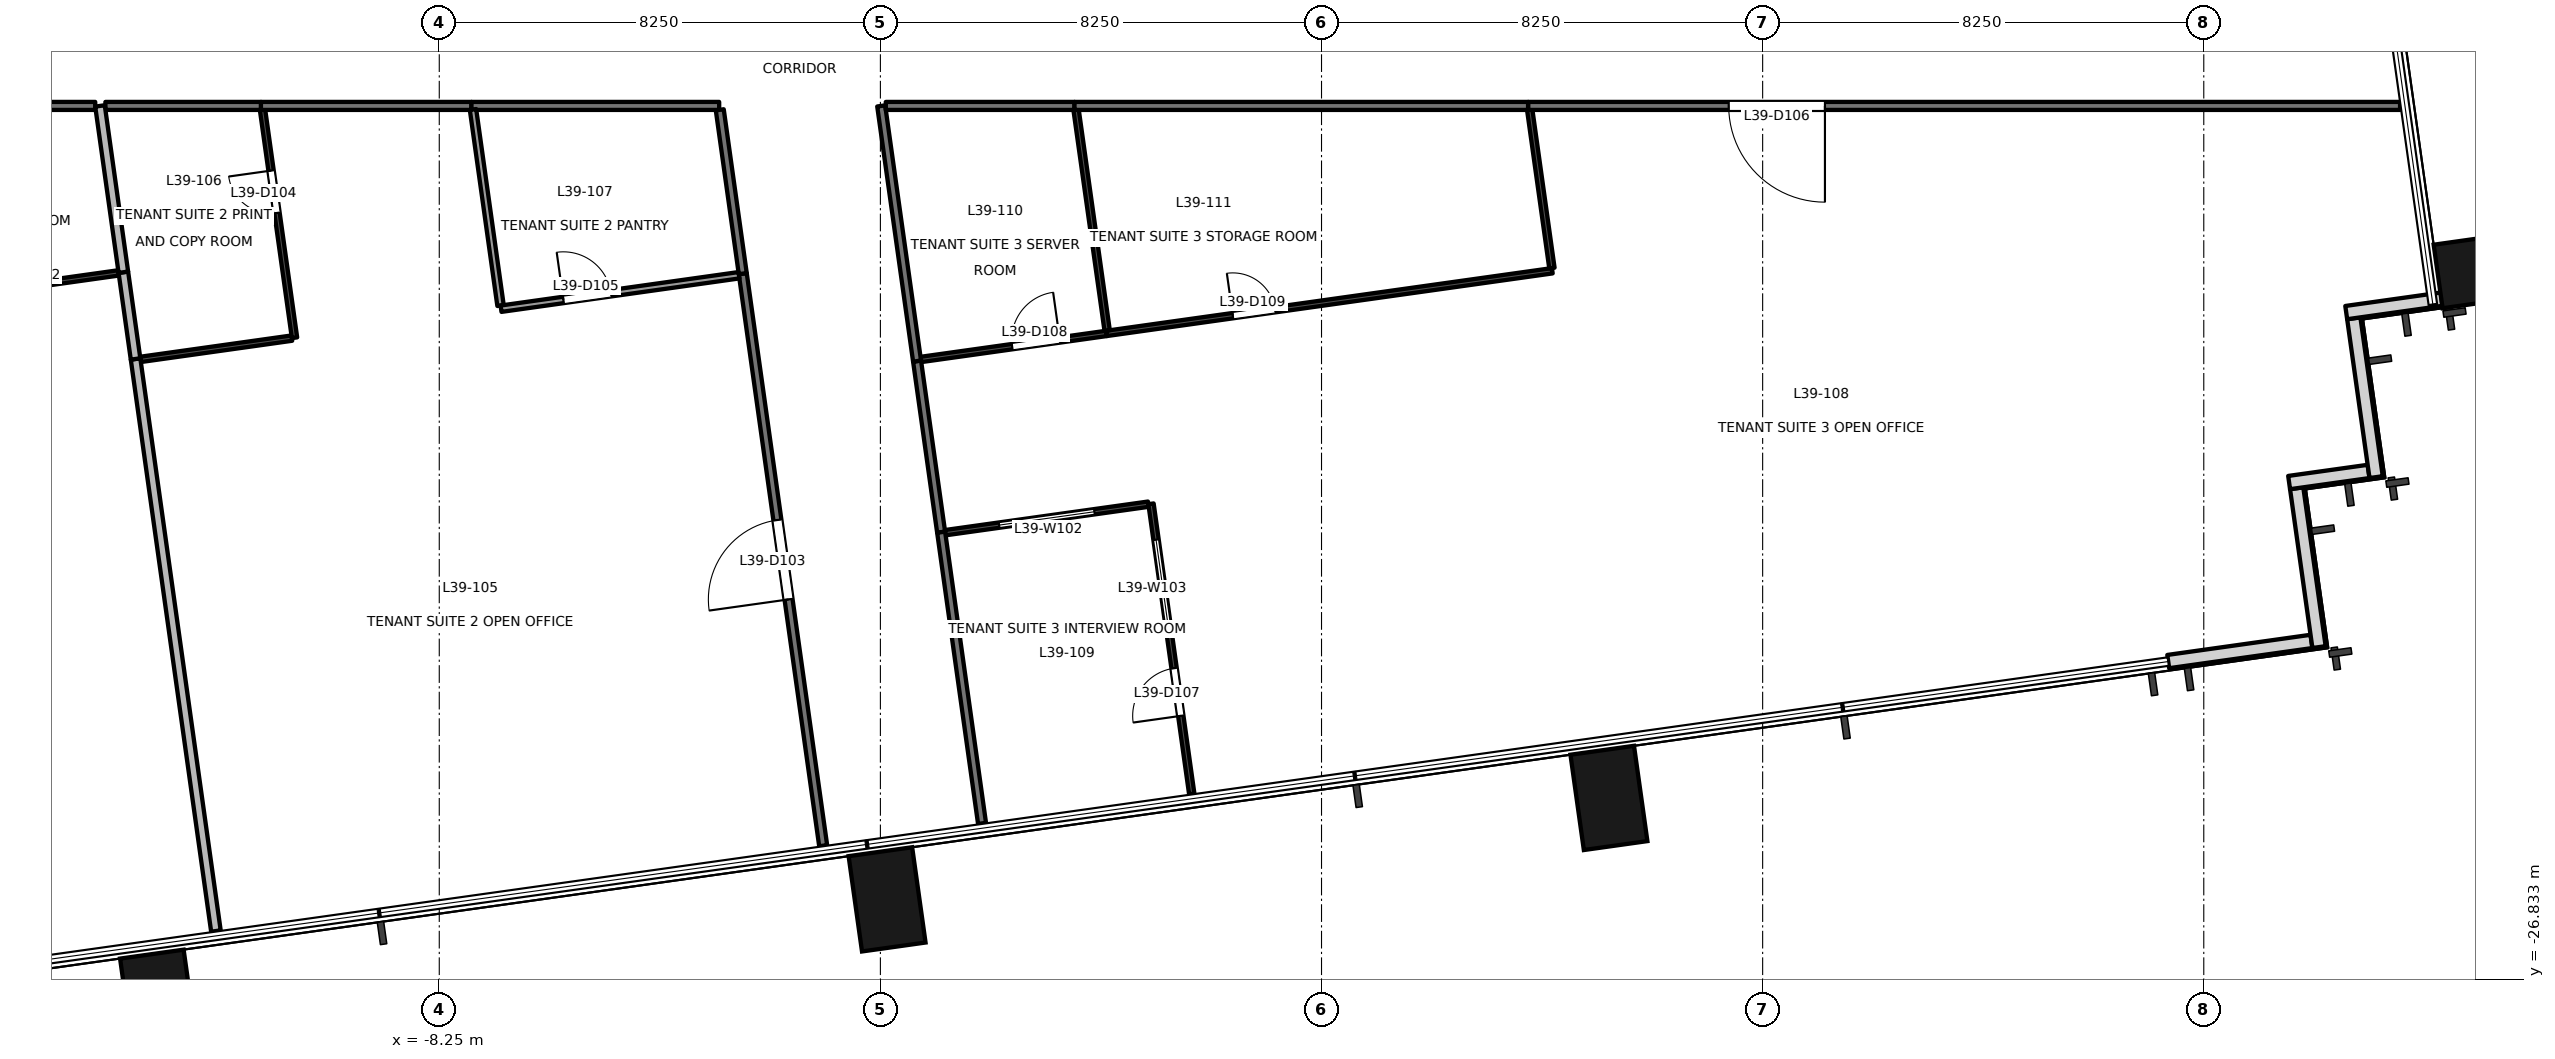
"""IFC4 building model, lengths in metres.
Left out: names, types, materials, properties, quantities, classifications, styles, units other than length and angle.
Written with IfcOpenShell. Run it as: python <this file> out.ifc"""

import sys

from ifc_helpers import new_model, si_unit, direction, frame, frame_2d, origin, origin_2d, place, context, subcontext, project, spatial, rectangle, extrude, element, fill, save


model = new_model("IFC4")
c1 = context("Model", 3, precision=1e-05, world=origin(), true_north=direction((0.0, 1.0)))
c2 = subcontext(c1, "Body", "Model", "MODEL_VIEW")
j1 = project(units=[si_unit("LENGTHUNIT", "METRE"), si_unit("PLANEANGLEUNIT", "RADIAN")], contexts=[c1])
p1 = place(None, origin())
s1 = spatial("IfcSite", under=j1, at=p1, CompositionType="ELEMENT")
p2 = place(p1, origin())
s2 = spatial("IfcBuilding", under=s1, at=p2, CompositionType="ELEMENT")
p3 = place(p2, frame((0.0, 0.0, 172.4)))
s3 = spatial("IfcBuildingStorey", under=s2, at=p3, CompositionType="ELEMENT", Elevation=172.4)
for number, where, z_axis, x_axis in (
    (1, (-13.5, -27.256, -0.2), (0.0, 0.0, 1.0), (0.99, 0.139, 0.0)),
    (2, (0.125, -25.34, -0.2), (0.0, 0.0, 1.0), (0.99, 0.139, 0.0)),
    (3, (13.625, -23.443, -0.2), (0.0, 0.0, 1.0), (0.99, 0.139, 0.0)),
    (4, (30.024, -13.565, -0.2), (0.0, 0.0, 1.0), (-0.139, 0.99, 0.0)),
):
    element("IfcColumn", number, at=place(p3, frame(where, z_axis=z_axis, x_axis=x_axis)), inside=s3, PredefinedType="COLUMN", context=c2, shape_type="SweptSolid", body=[
        extrude(rectangle(XDim=1.2, YDim=1.8, at=origin_2d()), origin(), (0.0, 0.0, 1.0), 3.9),
    ])
p4 = place(p3, frame((24.085, -20.893, 0.0), z_axis=(0.0, 0.0, 1.0), x_axis=(0.990255800966, 0.139260362823, 0.0)))
e5 = element("IfcWall", 5, at=p4, inside=s3, PredefinedType="SOLIDWALL", context=c2, shape_type="SweptSolid", body=[
    extrude(rectangle(XDim=2.705, YDim=0.25, at=frame_2d((1.353, 0.0))), origin(), (0.0, 0.0, 1.0), 3.7),
])
p5 = place(p3, frame((26.905, -20.622, 0.0), z_axis=(0.0, 0.0, 1.0), x_axis=(-0.139313431826, 0.990248336385, 0.0)))
e6 = element("IfcWall", 6, at=p5, inside=s3, PredefinedType="SOLIDWALL", context=c2, shape_type="SweptSolid", body=[
    extrude(rectangle(XDim=3.0, YDim=0.25, at=frame_2d((1.5, 0.0))), origin(), (0.0, 0.0, 1.0), 3.7),
])
p6 = place(p3, frame((26.346, -17.544, 0.0), z_axis=(0.0, 0.0, 1.0), x_axis=(0.990368090482, 0.13845954411, 0.0)))
e7 = element("IfcWall", 7, at=p6, inside=s3, PredefinedType="SOLIDWALL", context=c2, shape_type="SweptSolid", body=[
    extrude(rectangle(XDim=1.5, YDim=0.25, at=frame_2d((0.75, 0.0))), origin(), (0.0, 0.0, 1.0), 3.7),
])
p7 = place(p3, frame((27.973, -17.443, 0.0), z_axis=(0.0, 0.0, 1.0), x_axis=(-0.139313431826, 0.990248336385, 0.0)))
e8 = element("IfcWall", 8, at=p7, inside=s3, PredefinedType="SOLIDWALL", context=c2, shape_type="SweptSolid", body=[
    extrude(rectangle(XDim=3.0, YDim=0.25, at=frame_2d((1.5, 0.0))), origin(), (0.0, 0.0, 1.0), 3.7),
])
p8 = place(p3, frame((27.414, -14.366, 0.0), z_axis=(0.0, 0.0, 1.0), x_axis=(0.990256286673, 0.139256908998, 0.0)))
e9 = element("IfcWall", 9, at=p8, inside=s3, PredefinedType="SOLIDWALL", context=c2, shape_type="SweptSolid", body=[
    extrude(rectangle(XDim=1.801, YDim=0.25, at=frame_2d((0.9, 0.0))), origin(), (0.0, 0.0, 1.0), 3.7),
])
p9 = place(p3, frame((-14.684, -10.5, 0.0), z_axis=(0.0, 0.0, 1.0), x_axis=(-1.0, 0.0, 0.0)))
e10 = element("IfcWall", 10, at=p9, inside=s3, PredefinedType="PARTITIONING", context=c2, shape_type="SweptSolid", body=[
    extrude(rectangle(XDim=4.882, YDim=0.15, at=frame_2d((2.441, 0.0))), origin(), (0.0, 0.0, 1.0), 3.7),
])
p10 = place(p3, frame((-7.648, -10.5, 0.0), z_axis=(0.0, 0.0, 1.0), x_axis=(-1.0, 0.0, 0.0)))
e11 = element("IfcWall", 11, at=p10, inside=s3, PredefinedType="PARTITIONING", context=c2, shape_type="SweptSolid", body=[
    extrude(rectangle(XDim=3.938, YDim=0.15, at=frame_2d((1.969, 0.0))), origin(), (0.0, 0.0, 1.0), 2.8),
])
p11 = place(p3, frame((-1.07, -24.337, 0.0), z_axis=(0.0, 0.0, 1.0), x_axis=(-0.139184552649, 0.990266459244, 0.0)))
e12 = element("IfcWall", 12, at=p11, inside=s3, PredefinedType="PARTITIONING", context=c2, shape_type="SweptSolid", body=[
    extrude(rectangle(XDim=10.805, YDim=0.15, at=frame_2d((5.403, 0.0))), origin(), (0.0, 0.0, 1.0), 3.7),
])
p12 = place(p11, frame((4.652, 0.0, 0.0)))
e13 = element("IfcOpeningElement", 13, at=p12, cuts=e12, PredefinedType="OPENING", context=c2, shape_type="SweptSolid", body=[
    extrude(rectangle(XDim=1.5, YDim=2.1, at=frame_2d((0.75, 1.05))), frame((0.0, 0.085, 0.0), z_axis=(0.0, -1.0, 0.0), x_axis=(1.0, 0.0, 0.0)), (0.0, 0.0, 1.0), 0.171),
])
p13 = place(p3, frame((-11.586, -10.5, 0.0), z_axis=(0.0, 0.0, 1.0), x_axis=(-1.0, 0.0, 0.0)))
e14 = element("IfcWall", 14, at=p13, inside=s3, PredefinedType="PARTITIONING", context=c2, shape_type="SweptSolid", body=[
    extrude(rectangle(XDim=2.908, YDim=0.15, at=frame_2d((1.454, 0.0))), origin(), (0.0, 0.0, 1.0), 2.8),
])
p14 = place(p3, frame((-3.015, -10.5, 0.0), z_axis=(0.0, 0.0, 1.0), x_axis=(-1.0, 0.0, 0.0)))
e15 = element("IfcWall", 15, at=p14, inside=s3, PredefinedType="PARTITIONING", context=c2, shape_type="SweptSolid", body=[
    extrude(rectangle(XDim=4.633, YDim=0.15, at=frame_2d((2.316, 0.0))), origin(), (0.0, 0.0, 1.0), 2.9),
])
p15 = place(p3, frame((-2.574, -13.637, 0.0), z_axis=(0.0, 0.0, 1.0), x_axis=(-0.138957403221, 0.990298359127, 0.0)))
e16 = element("IfcWall", 16, at=p15, inside=s3, PredefinedType="PARTITIONING", context=c2, shape_type="SweptSolid", body=[
    extrude(rectangle(XDim=3.094, YDim=0.15, at=frame_2d((1.547, 0.0))), origin(), (0.0, 0.0, 1.0), 3.7),
])
p16 = place(p3, frame((0.686, -15.273, 0.0), z_axis=(0.0, 0.0, 1.0), x_axis=(0.139242097723, -0.990258369428, 0.0)))
e17 = element("IfcWall", 17, at=p16, inside=s3, PredefinedType="PARTITIONING", context=c2, shape_type="SweptSolid", body=[
    extrude(rectangle(XDim=3.231, YDim=0.15, at=frame_2d((1.616, 0.0))), origin(), (0.0, 0.0, 1.0), 3.7),
])
p17 = place(p3, frame((28.421, -10.5, 0.0), z_axis=(0.0, 0.0, 1.0), x_axis=(-1.0, 0.0, 0.0)))
e18 = element("IfcWall", 18, at=p17, inside=s3, PredefinedType="PARTITIONING", context=c2, shape_type="SweptSolid", body=[
    extrude(rectangle(XDim=16.308, YDim=0.15, at=frame_2d((8.154, 0.0))), origin(), (0.0, 0.0, 1.0), 3.1),
])
p18 = place(p17, frame((10.756, 0.0, 0.0)))
e19 = element("IfcOpeningElement", 19, at=p18, cuts=e18, PredefinedType="OPENING", context=c2, shape_type="SweptSolid", body=[
    extrude(rectangle(XDim=1.8, YDim=2.1, at=frame_2d((0.9, 1.05))), frame((0.0, 0.085, 0.0), z_axis=(0.0, -1.0, 0.0), x_axis=(1.0, 0.0, 0.0)), (0.0, 0.0, 1.0), 0.171),
])
p19 = place(p3, frame((1.136, -18.473, 0.0), z_axis=(0.0, 0.0, 1.0), x_axis=(0.139059647431, -0.990284006968, 0.0)))
e20 = element("IfcWall", 20, at=p19, inside=s3, PredefinedType="PARTITIONING", context=c2, shape_type="SweptSolid", body=[
    extrude(rectangle(XDim=5.5, YDim=0.15, at=frame_2d((2.75, 0.0))), origin(), (0.0, 0.0, 1.0), 3.7),
])
p20 = place(p3, frame((0.015, -10.5, 0.0), z_axis=(0.0, 0.0, 1.0), x_axis=(0.139243966004, -0.990258106723, 0.0)))
e21 = element("IfcWall", 21, at=p20, inside=s3, PredefinedType="PARTITIONING", context=c2, shape_type="SweptSolid", body=[
    extrude(rectangle(XDim=4.82, YDim=0.15, at=frame_2d((2.41, 0.0))), origin(), (0.0, 0.0, 1.0), 2.9),
])
p21 = place(p3, frame((3.63, -10.5, 0.0), z_axis=(0.0, 0.0, 1.0), x_axis=(-1.0, 0.0, 0.0)))
e22 = element("IfcWall", 22, at=p21, inside=s3, PredefinedType="PARTITIONING", context=c2, shape_type="SweptSolid", body=[
    extrude(rectangle(XDim=3.529, YDim=0.15, at=frame_2d((1.764, 0.0))), origin(), (0.0, 0.0, 1.0), 2.9),
])
p22 = place(p3, frame((12.113, -10.5, 0.0), z_axis=(0.0, 0.0, 1.0), x_axis=(-1.0, 0.0, 0.0)))
e23 = element("IfcWall", 23, at=p22, inside=s3, PredefinedType="PARTITIONING", context=c2, shape_type="SweptSolid", body=[
    extrude(rectangle(XDim=8.483, YDim=0.15, at=frame_2d((4.242, 0.0))), origin(), (0.0, 0.0, 1.0), 2.9),
])
p23 = place(p3, frame((-19.013, -14.293, 0.0), z_axis=(0.0, 0.0, 1.0), x_axis=(0.990264556242, 0.139198091406, 0.0)))
e24 = element("IfcWall", 24, at=p23, inside=s3, PredefinedType="PARTITIONING", context=c2, shape_type="SweptSolid", body=[
    extrude(rectangle(XDim=4.813, YDim=0.1, at=frame_2d((2.406, 0.0))), origin(), (0.0, 0.0, 1.0), 3.7),
])
p24 = place(p23, frame((2.709, 0.0, 0.0)))
e25 = element("IfcOpeningElement", 25, at=p24, cuts=e24, PredefinedType="OPENING", context=c2, shape_type="SweptSolid", body=[
    extrude(rectangle(XDim=0.8, YDim=2.1, at=frame_2d((0.4, 1.05))), frame((0.0, 0.061, 0.0), z_axis=(0.0, -1.0, 0.0), x_axis=(1.0, 0.0, 0.0)), (0.0, 0.0, 1.0), 0.121),
])
p25 = place(p3, frame((-13.93, -15.233, 0.0), z_axis=(0.0, 0.0, 1.0), x_axis=(0.139092809985, -0.990279349583, 0.0)))
e26 = element("IfcWall", 26, at=p25, inside=s3, PredefinedType="PARTITIONING", context=c2, shape_type="SweptSolid", body=[
    extrude(rectangle(XDim=10.805, YDim=0.18, at=frame_2d((5.403, 0.0))), origin(), (0.0, 0.0, 1.0), 2.8),
])
p26 = place(p3, frame((-14.158, -13.611, 0.0), z_axis=(0.0, 0.0, 1.0), x_axis=(0.139229707098, -0.990260111618, 0.0)))
e27 = element("IfcWall", 27, at=p26, inside=s3, PredefinedType="PARTITIONING", context=c2, shape_type="SweptSolid", body=[
    extrude(rectangle(XDim=1.638, YDim=0.18, at=frame_2d((0.819, 0.0))), origin(), (0.0, 0.0, 1.0), 3.7),
])
p27 = place(p3, frame((-14.595, -10.5, 0.0), z_axis=(0.0, 0.0, 1.0), x_axis=(0.139103611391, -0.990277832377, 0.0)))
e28 = element("IfcWall", 28, at=p27, inside=s3, PredefinedType="PARTITIONING", context=c2, shape_type="SweptSolid", body=[
    extrude(rectangle(XDim=3.142, YDim=0.18, at=frame_2d((1.571, 0.0))), origin(), (0.0, 0.0, 1.0), 3.7),
])
p28 = place(p3, frame((-13.838, -15.241, 0.0), z_axis=(0.0, 0.0, 1.0), x_axis=(0.990263018372, 0.139209031475, 0.0)))
e29 = element("IfcWall", 29, at=p28, inside=s3, PredefinedType="PARTITIONING", context=c2, shape_type="SweptSolid", body=[
    extrude(rectangle(XDim=2.859, YDim=0.1, at=frame_2d((1.429, 0.0))), origin(), (0.0, 0.0, 1.0), 2.8),
])
p29 = place(p3, frame((-10.957, -14.836, 0.0), z_axis=(0.0, 0.0, 1.0), x_axis=(-0.138962312518, 0.990297670249, 0.0)))
e30 = element("IfcWall", 30, at=p29, inside=s3, PredefinedType="PARTITIONING", context=c2, shape_type="SweptSolid", body=[
    extrude(rectangle(XDim=4.31, YDim=0.1, at=frame_2d((2.155, 0.0))), origin(), (0.0, 0.0, 1.0), 3.7),
])
p30 = place(p29, frame((2.357, 0.0, 0.0)))
e31 = element("IfcOpeningElement", 31, at=p30, cuts=e30, PredefinedType="OPENING", context=c2, shape_type="SweptSolid", body=[
    extrude(rectangle(XDim=0.8, YDim=2.1, at=frame_2d((0.4, 1.05))), frame((0.0, 0.061, 0.0), z_axis=(0.0, -1.0, 0.0), x_axis=(1.0, 0.0, 0.0)), (0.0, 0.0, 1.0), 0.121),
])
p31 = place(p3, frame((-7.619, -10.567, 0.0), z_axis=(0.0, 0.0, 1.0), x_axis=(0.13904874823, -0.990285537416, 0.0)))
e32 = element("IfcWall", 32, at=p31, inside=s3, PredefinedType="PARTITIONING", context=c2, shape_type="SweptSolid", body=[
    extrude(rectangle(XDim=3.703, YDim=0.12, at=frame_2d((1.852, 0.0))), origin(), (0.0, 0.0, 1.0), 3.7),
])
p32 = place(p3, frame((-7.095, -14.293, 0.0), z_axis=(0.0, 0.0, 1.0), x_axis=(0.990250373685, 0.139298949807, 0.0)))
e33 = element("IfcWall", 33, at=p32, inside=s3, PredefinedType="PARTITIONING", context=c2, shape_type="SweptSolid", body=[
    extrude(rectangle(XDim=4.494, YDim=0.12, at=frame_2d((2.247, 0.0))), origin(), (0.0, 0.0, 1.0), 2.9),
])
p33 = place(p32, frame((1.178, 0.0, 0.0)))
e34 = element("IfcOpeningElement", 34, at=p33, cuts=e33, PredefinedType="OPENING", context=c2, shape_type="SweptSolid", body=[
    extrude(rectangle(XDim=0.9, YDim=2.1, at=frame_2d((0.45, 1.05))), frame((0.0, 0.071, 0.0), z_axis=(0.0, -1.0, 0.0), x_axis=(1.0, 0.0, 0.0)), (0.0, 0.0, 1.0), 0.141),
])
p34 = place(p3, frame((5.011, -17.949, 0.0), z_axis=(0.0, 0.0, 1.0), x_axis=(-0.99029781958, -0.138961248322, 0.0)))
e35 = element("IfcWall", 35, at=p34, inside=s3, PredefinedType="PARTITIONING", context=c2, shape_type="SweptSolid", body=[
    extrude(rectangle(XDim=3.835, YDim=0.1, at=frame_2d((1.917, 0.0))), origin(), (0.0, 0.0, 1.0), 2.9),
])
p35 = place(p34, frame((1.018, 0.0, 0.9)))
e36 = element("IfcOpeningElement", 36, at=p35, cuts=e35, PredefinedType="OPENING", context=c2, shape_type="SweptSolid", body=[
    extrude(rectangle(XDim=1.8, YDim=1.2, at=frame_2d((0.9, 0.6))), frame((0.0, 0.061, 0.0), z_axis=(0.0, -1.0, 0.0), x_axis=(1.0, 0.0, 0.0)), (0.0, 0.0, 1.0), 0.121),
])
p36 = place(p3, frame((5.823, -23.368, 0.0), z_axis=(0.0, 0.0, 1.0), x_axis=(-0.13906298859, 0.990283537783, 0.0)))
e37 = element("IfcWall", 37, at=p36, inside=s3, PredefinedType="PARTITIONING", context=c2, shape_type="SweptSolid", body=[
    extrude(rectangle(XDim=5.479, YDim=0.1, at=frame_2d((2.74, 0.0))), origin(), (0.0, 0.0, 1.0), 3.7),
])
p37 = place(p36, frame((1.474, 0.0, 0.0)))
e38 = element("IfcOpeningElement", 38, at=p37, cuts=e37, PredefinedType="OPENING", context=c2, shape_type="SweptSolid", body=[
    extrude(rectangle(XDim=0.9, YDim=2.1, at=frame_2d((0.45, 1.05))), frame((0.0, 0.061, 0.0), z_axis=(0.0, -1.0, 0.0), x_axis=(1.0, 0.0, 0.0)), (0.0, 0.0, 1.0), 0.121),
])
p38 = place(p36, frame((3.002, 0.0, 0.9)))
e39 = element("IfcOpeningElement", 39, at=p38, cuts=e37, PredefinedType="OPENING", context=c2, shape_type="SweptSolid", body=[
    extrude(rectangle(XDim=1.8, YDim=1.2, at=frame_2d((0.9, 0.6))), frame((0.0, 0.061, 0.0), z_axis=(0.0, -1.0, 0.0), x_axis=(1.0, 0.0, 0.0)), (0.0, 0.0, 1.0), 0.121),
])
p39 = place(p3, frame((0.758, -15.242, 0.0), z_axis=(0.0, 0.0, 1.0), x_axis=(0.990292126352, 0.139001814682, 0.0)))
e40 = element("IfcWall", 40, at=p39, inside=s3, PredefinedType="PARTITIONING", context=c2, shape_type="SweptSolid", body=[
    extrude(rectangle(XDim=3.504, YDim=0.1, at=frame_2d((1.752, 0.0))), origin(), (0.0, 0.0, 1.0), 3.7),
])
p40 = place(p39, frame((1.723, 0.0, 0.0)))
e41 = element("IfcOpeningElement", 41, at=p40, cuts=e40, PredefinedType="OPENING", context=c2, shape_type="SweptSolid", body=[
    extrude(rectangle(XDim=0.9, YDim=2.1, at=frame_2d((0.45, 1.05))), frame((0.0, 0.061, 0.0), z_axis=(0.0, -1.0, 0.0), x_axis=(1.0, 0.0, 0.0)), (0.0, 0.0, 1.0), 0.121),
])
p41 = place(p3, frame((4.228, -14.755, 0.0), z_axis=(0.0, 0.0, 1.0), x_axis=(0.990267072018, 0.139180192835, 0.0)))
e42 = element("IfcWall", 42, at=p41, inside=s3, PredefinedType="PARTITIONING", context=c2, shape_type="SweptSolid", body=[
    extrude(rectangle(XDim=8.42, YDim=0.1, at=frame_2d((4.21, 0.0))), origin(), (0.0, 0.0, 1.0), 2.9),
])
p42 = place(p41, frame((2.386, 0.0, 0.0)))
e43 = element("IfcOpeningElement", 43, at=p42, cuts=e42, PredefinedType="OPENING", context=c2, shape_type="SweptSolid", body=[
    extrude(rectangle(XDim=0.8, YDim=2.1, at=frame_2d((0.4, 1.05))), frame((0.0, 0.061, 0.0), z_axis=(0.0, -1.0, 0.0), x_axis=(1.0, 0.0, 0.0)), (0.0, 0.0, 1.0), 0.121),
])
p43 = place(p3, frame((12.559, -13.533, 0.0), z_axis=(0.0, 0.0, 1.0), x_axis=(-0.138954956276, 0.990298702476, 0.0)))
e44 = element("IfcWall", 44, at=p43, inside=s3, PredefinedType="PARTITIONING", context=c2, shape_type="SweptSolid", body=[
    extrude(rectangle(XDim=2.994, YDim=0.1, at=frame_2d((1.497, 0.0))), origin(), (0.0, 0.0, 1.0), 3.7),
])
p44 = place(p3, frame((3.659, -10.568, 0.0), z_axis=(0.0, 0.0, 1.0), x_axis=(0.139423291569, -0.990232874514, 0.0)))
e45 = element("IfcWall", 45, at=p44, inside=s3, PredefinedType="PARTITIONING", context=c2, shape_type="SweptSolid", body=[
    extrude(rectangle(XDim=4.175, YDim=0.1, at=frame_2d((2.087, 0.0))), origin(), (0.0, 0.0, 1.0), 3.7),
])
p45 = place(p12, origin())
e46 = element("IfcDoor", 46, at=p45, inside=s3, OperationType="DOUBLE_DOOR_SINGLE_SWING", PredefinedType="DOOR", context=c2, shape_type="SweptSolid", body=[
    extrude(rectangle(XDim=1.5, YDim=2.1, at=frame_2d((0.75, 1.05))), frame((0.0, 0.025, 0.0), z_axis=(0.0, -1.0, 0.0), x_axis=(1.0, 0.0, 0.0)), (0.0, 0.0, 1.0), 0.05),
])
fill(e13, e46)
p46 = place(p30, origin())
e47 = element("IfcDoor", 47, at=p46, inside=s3, OperationType="SINGLE_SWING_RIGHT", PredefinedType="DOOR", context=c2, shape_type="SweptSolid", body=[
    extrude(rectangle(XDim=0.8, YDim=2.1, at=frame_2d((0.4, 1.05))), frame((0.0, 0.025, 0.0), z_axis=(0.0, -1.0, 0.0), x_axis=(1.0, 0.0, 0.0)), (0.0, 0.0, 1.0), 0.05),
])
fill(e31, e47)
p47 = place(p33, origin())
e48 = element("IfcDoor", 48, at=p47, inside=s3, OperationType="SINGLE_SWING_LEFT", PredefinedType="DOOR", context=c2, shape_type="SweptSolid", body=[
    extrude(rectangle(XDim=0.9, YDim=2.1, at=frame_2d((0.45, 1.05))), frame((0.0, 0.025, 0.0), z_axis=(0.0, -1.0, 0.0), x_axis=(1.0, 0.0, 0.0)), (0.0, 0.0, 1.0), 0.05),
])
fill(e34, e48)
p48 = place(p18, origin())
e49 = element("IfcDoor", 49, at=p48, inside=s3, OperationType="DOUBLE_DOOR_SINGLE_SWING", PredefinedType="DOOR", context=c2, shape_type="SweptSolid", body=[
    extrude(rectangle(XDim=1.8, YDim=2.1, at=frame_2d((0.9, 1.05))), frame((0.0, 0.025, 0.0), z_axis=(0.0, -1.0, 0.0), x_axis=(1.0, 0.0, 0.0)), (0.0, 0.0, 1.0), 0.05),
])
fill(e19, e49)
p49 = place(p37, origin())
e50 = element("IfcDoor", 50, at=p49, inside=s3, OperationType="SINGLE_SWING_LEFT", PredefinedType="DOOR", context=c2, shape_type="SweptSolid", body=[
    extrude(rectangle(XDim=0.9, YDim=2.1, at=frame_2d((0.45, 1.05))), frame((0.0, 0.025, 0.0), z_axis=(0.0, -1.0, 0.0), x_axis=(1.0, 0.0, 0.0)), (0.0, 0.0, 1.0), 0.05),
])
fill(e38, e50)
p50 = place(p40, origin())
e51 = element("IfcDoor", 51, at=p50, inside=s3, OperationType="SINGLE_SWING_RIGHT", PredefinedType="DOOR", context=c2, shape_type="SweptSolid", body=[
    extrude(rectangle(XDim=0.9, YDim=2.1, at=frame_2d((0.45, 1.05))), frame((0.0, 0.025, 0.0), z_axis=(0.0, -1.0, 0.0), x_axis=(1.0, 0.0, 0.0)), (0.0, 0.0, 1.0), 0.05),
])
fill(e41, e51)
p51 = place(p42, origin())
e52 = element("IfcDoor", 52, at=p51, inside=s3, OperationType="SINGLE_SWING_LEFT", PredefinedType="DOOR", context=c2, shape_type="SweptSolid", body=[
    extrude(rectangle(XDim=0.8, YDim=2.1, at=frame_2d((0.4, 1.05))), frame((0.0, 0.025, 0.0), z_axis=(0.0, -1.0, 0.0), x_axis=(1.0, 0.0, 0.0)), (0.0, 0.0, 1.0), 0.05),
])
fill(e43, e52)
p52 = place(p35, origin())
e53 = element("IfcWindow", 53, at=p52, inside=s3, PartitioningType="SINGLE_PANEL", PredefinedType="WINDOW", context=c2, shape_type="SweptSolid", body=[
    extrude(rectangle(XDim=1.8, YDim=1.2, at=frame_2d((0.9, 0.6))), frame((0.0, 0.03, 0.0), z_axis=(0.0, -1.0, 0.0), x_axis=(1.0, 0.0, 0.0)), (0.0, 0.0, 1.0), 0.06),
])
fill(e36, e53)
p53 = place(p38, origin())
e54 = element("IfcWindow", 54, at=p53, inside=s3, PartitioningType="SINGLE_PANEL", PredefinedType="WINDOW", context=c2, shape_type="SweptSolid", body=[
    extrude(rectangle(XDim=1.8, YDim=1.2, at=frame_2d((0.9, 0.6))), frame((0.0, 0.03, 0.0), z_axis=(0.0, -1.0, 0.0), x_axis=(1.0, 0.0, 0.0)), (0.0, 0.0, 1.0), 0.06),
])
fill(e39, e54)
save(model, sys.argv[1])
